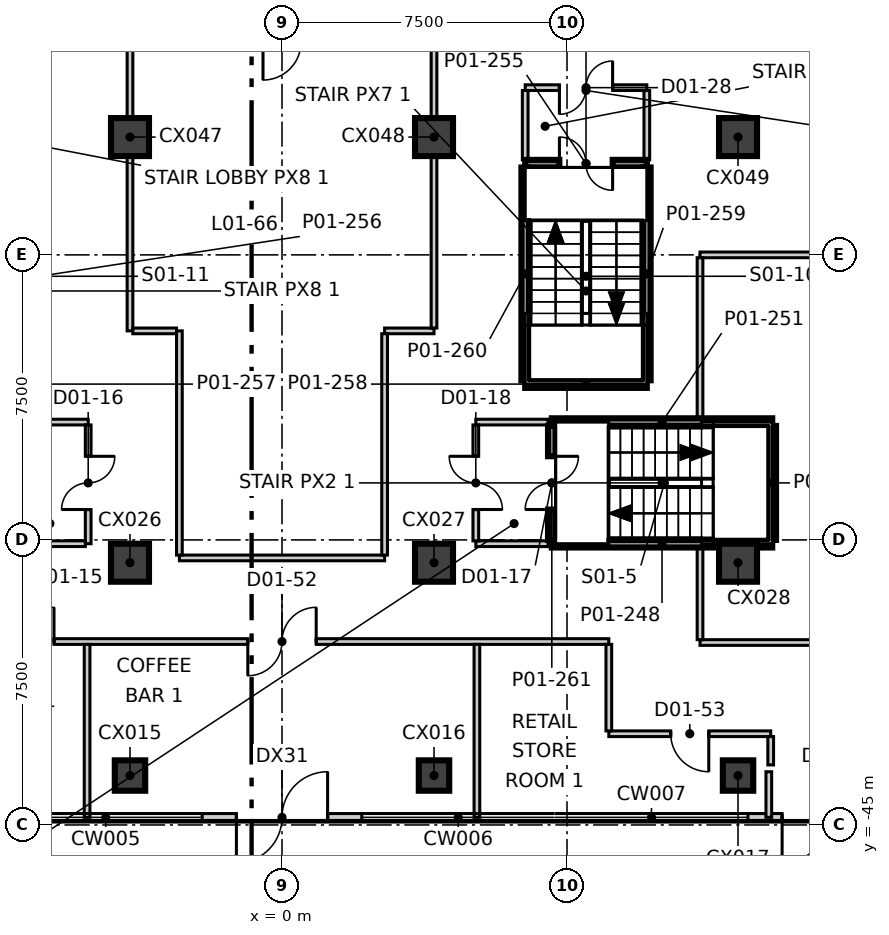
"""IFC4 building model, lengths in metres.
Left out: names, types, materials, properties, quantities, classifications, styles, units other than length and angle.
Written with IfcOpenShell. Run it as: python <this file> out.ifc"""

import sys

from ifc_helpers import new_model, si_unit, direction, frame, frame_2d, origin, origin_2d, place, context, subcontext, project, spatial, rectangle, extrude, element, fill, save


model = new_model("IFC4")
c1 = context("Model", 3, precision=1e-05, world=origin(), true_north=direction((0.0, 1.0)))
c2 = subcontext(c1, "Body", "Model", "MODEL_VIEW")
j1 = project(units=[si_unit("LENGTHUNIT", "METRE"), si_unit("PLANEANGLEUNIT", "RADIAN")], contexts=[c1])
p1 = place(None, origin())
s1 = spatial("IfcSite", under=j1, at=p1, CompositionType="ELEMENT")
p2 = place(p1, origin())
s2 = spatial("IfcBuilding", under=s1, at=p2, CompositionType="ELEMENT")
p3 = place(p2, frame((0.0, 0.0, 8.5)))
s3 = spatial("IfcBuildingStorey", under=s2, at=p3, CompositionType="ELEMENT", Elevation=8.5)
for number, where, z_axis, x_axis in (
    (1, (-4.0, -43.7, -0.4), (0.0, 0.0, 1.0), (1.0, 0.0, 0.0)),
    (2, (4.0, -43.7, -0.4), (0.0, 0.0, 1.0), (1.0, 0.0, 0.0)),
    (3, (12.0, -43.7, -0.4), (0.0, 0.0, 1.0), (1.0, 0.0, 0.0)),
):
    element("IfcColumn", number, at=place(p3, frame(where, z_axis=z_axis, x_axis=x_axis)), inside=s3, PredefinedType="COLUMN", context=c2, shape_type="SweptSolid", body=[
        extrude(rectangle(XDim=0.8, YDim=0.8, at=origin_2d()), origin(), (0.0, 0.0, 1.0), 6.0),
    ])
for number, where, z_axis, x_axis in (
    (4, (-4.0, -38.1, -0.4), (0.0, 0.0, 1.0), (1.0, 0.0, 0.0)),
    (5, (4.0, -38.1, -0.4), (0.0, 0.0, 1.0), (1.0, 0.0, 0.0)),
    (6, (12.0, -38.1, -0.4), (0.0, 0.0, 1.0), (1.0, 0.0, 0.0)),
    (7, (-4.0, -26.9, -0.4), (0.0, 0.0, 1.0), (1.0, 0.0, 0.0)),
    (8, (4.0, -26.9, -0.4), (0.0, 0.0, 1.0), (1.0, 0.0, 0.0)),
    (9, (12.0, -26.9, -0.4), (0.0, 0.0, 1.0), (1.0, 0.0, 0.0)),
):
    element("IfcColumn", number, at=place(p3, frame(where, z_axis=z_axis, x_axis=x_axis)), inside=s3, PredefinedType="COLUMN", context=c2, shape_type="SweptSolid", body=[
        extrude(rectangle(XDim=1.0, YDim=1.0, at=origin_2d()), origin(), (0.0, 0.0, 1.0), 6.0),
    ])
p4 = place(p3, frame((-2.1, -44.8, 0.0), z_axis=(0.0, 0.0, 1.0), x_axis=(1.0, 0.0, 0.0)))
e10 = element("IfcWall", 10, at=p4, inside=s3, PredefinedType="ELEMENTEDWALL", context=c2, shape_type="SweptSolid", body=[
    extrude(rectangle(XDim=4.2, YDim=0.2, at=frame_2d((2.1, 0.0))), origin(), (0.0, 0.0, 1.0), 5.6),
])
p5 = place(p4, frame((0.9, 0.0, 0.0)))
e11 = element("IfcOpeningElement", 11, at=p5, cuts=e10, PredefinedType="OPENING", context=c2, shape_type="SweptSolid", body=[
    extrude(rectangle(XDim=2.4, YDim=2.4, at=frame_2d((1.2, 1.2))), frame((0.0, 0.11, 0.0), z_axis=(0.0, -1.0, 0.0), x_axis=(1.0, 0.0, 0.0)), (0.0, 0.0, 1.0), 0.22),
])
p6 = place(p3, frame((12.26, -44.8, 0.0), z_axis=(0.0, 0.0, 1.0), x_axis=(1.0, 0.0, 0.0)))
e12 = element("IfcWall", 12, at=p6, inside=s3, PredefinedType="ELEMENTEDWALL", context=c2, shape_type="SweptSolid", body=[
    extrude(rectangle(XDim=4.2, YDim=0.2, at=frame_2d((2.1, 0.0))), origin(), (0.0, 0.0, 1.0), 5.6),
])
p7 = place(p6, frame((0.9, 0.0, 0.0)))
e13 = element("IfcOpeningElement", 13, at=p7, cuts=e12, PredefinedType="OPENING", context=c2, shape_type="SweptSolid", body=[
    extrude(rectangle(XDim=2.4, YDim=2.4, at=frame_2d((1.2, 1.2))), frame((0.0, 0.11, 0.0), z_axis=(0.0, -1.0, 0.0), x_axis=(1.0, 0.0, 0.0)), (0.0, 0.0, 1.0), 0.22),
])
p8 = place(p3, frame((6.4, -25.6, 0.0), z_axis=(0.0, 0.0, 1.0), x_axis=(1.0, 0.0, 0.0)))
e14 = element("IfcWall", 14, at=p8, inside=s3, PredefinedType="PARTITIONING", context=c2, shape_type="SweptSolid", body=[
    extrude(rectangle(XDim=3.2, YDim=0.15, at=frame_2d((1.6, 0.0))), origin(), (0.0, 0.0, 1.0), 5.6),
])
p9 = place(p8, frame((0.9, 0.0, 0.0)))
e15 = element("IfcOpeningElement", 15, at=p9, cuts=e14, PredefinedType="OPENING", context=c2, shape_type="SweptSolid", body=[
    extrude(rectangle(XDim=1.4, YDim=2.1, at=frame_2d((0.7, 1.05))), frame((0.0, 0.085, 0.0), z_axis=(0.0, -1.0, 0.0), x_axis=(1.0, 0.0, 0.0)), (0.0, 0.0, 1.0), 0.17),
])
for number, where, z_axis, x_axis in (
    (16, (-7.0, -34.4, 0.0), (0.0, 0.0, 1.0), (1.0, 0.0, 0.0)),
    (17, (5.1, -34.4, 0.0), (0.0, 0.0, 1.0), (1.0, 0.0, 0.0)),
):
    element("IfcWall", number, at=place(p3, frame(where, z_axis=z_axis, x_axis=x_axis)), inside=s3, PredefinedType="PARTITIONING", context=c2, shape_type="SweptSolid", body=[
        extrude(rectangle(XDim=1.9, YDim=0.15, at=frame_2d((0.95, 0.0))), origin(), (0.0, 0.0, 1.0), 5.6),
    ])
p10 = place(p3, frame((-5.1, -37.6, 0.0), z_axis=(0.0, 0.0, 1.0), x_axis=(0.0, 1.0, 0.0)))
e18 = element("IfcWall", 18, at=p10, inside=s3, PredefinedType="PARTITIONING", context=c2, shape_type="SweptSolid", body=[
    extrude(rectangle(XDim=3.125, YDim=0.15, at=frame_2d((1.562, 0.0))), origin(), (0.0, 0.0, 1.0), 5.6),
])
p11 = place(p10, frame((0.9, 0.0, 0.0)))
e19 = element("IfcOpeningElement", 19, at=p11, cuts=e18, PredefinedType="OPENING", context=c2, shape_type="SweptSolid", body=[
    extrude(rectangle(XDim=1.4, YDim=2.1, at=frame_2d((0.7, 1.05))), frame((0.0, 0.085, 0.0), z_axis=(0.0, -1.0, 0.0), x_axis=(1.0, 0.0, 0.0)), (0.0, 0.0, 1.0), 0.17),
])
p12 = place(p3, frame((-7.0, -37.6, 0.0), z_axis=(0.0, 0.0, 1.0), x_axis=(1.0, 0.0, 0.0)))
e20 = element("IfcWall", 20, at=p12, inside=s3, PredefinedType="PARTITIONING", context=c2, shape_type="SweptSolid", body=[
    extrude(rectangle(XDim=1.825, YDim=0.15, at=frame_2d((0.913, 0.0))), origin(), (0.0, 0.0, 1.0), 5.6),
])
p13 = place(p3, frame((5.1, -37.6, 0.0), z_axis=(0.0, 0.0, 1.0), x_axis=(1.0, 0.0, 0.0)))
e21 = element("IfcWall", 21, at=p13, inside=s3, PredefinedType="PARTITIONING", context=c2, shape_type="SweptSolid", body=[
    extrude(rectangle(XDim=1.9, YDim=0.15, at=frame_2d((0.95, 0.0))), origin(), (0.0, 0.0, 1.0), 5.6),
])
for number, where, z_axis, x_axis in (
    (22, (6.4, -27.5, 0.0), (0.0, 0.0, 1.0), (0.0, 1.0, 0.0)),
    (23, (9.6, -27.5, 0.0), (0.0, 0.0, 1.0), (0.0, 1.0, 0.0)),
):
    element("IfcWall", number, at=place(p3, frame(where, z_axis=z_axis, x_axis=x_axis)), inside=s3, PredefinedType="PARTITIONING", context=c2, shape_type="SweptSolid", body=[
        extrude(rectangle(XDim=1.825, YDim=0.15, at=frame_2d((0.913, 0.0))), origin(), (0.0, 0.0, 1.0), 5.6),
    ])
p14 = place(p3, frame((5.1, -37.525, 0.0), z_axis=(0.0, 0.0, 1.0), x_axis=(0.0, 1.0, 0.0)))
e24 = element("IfcWall", 24, at=p14, inside=s3, PredefinedType="PARTITIONING", context=c2, shape_type="SweptSolid", body=[
    extrude(rectangle(XDim=3.05, YDim=0.15, at=frame_2d((1.525, 0.0))), origin(), (0.0, 0.0, 1.0), 5.6),
])
p15 = place(p14, frame((0.825, 0.0, 0.0)))
e25 = element("IfcOpeningElement", 25, at=p15, cuts=e24, PredefinedType="OPENING", context=c2, shape_type="SweptSolid", body=[
    extrude(rectangle(XDim=1.4, YDim=2.1, at=frame_2d((0.7, 1.05))), frame((0.0, 0.085, 0.0), z_axis=(0.0, -1.0, 0.0), x_axis=(1.0, 0.0, 0.0)), (0.0, 0.0, 1.0), 0.17),
])
p16 = place(p3, frame((8.6, -42.6, 0.0), z_axis=(0.0, 0.0, 1.0), x_axis=(1.0, 0.0, 0.0)))
e26 = element("IfcWall", 26, at=p16, inside=s3, PredefinedType="PARTITIONING", context=c2, shape_type="SweptSolid", body=[
    extrude(rectangle(XDim=4.26, YDim=0.15, at=frame_2d((2.13, 0.0))), origin(), (0.0, 0.0, 1.0), 5.6),
])
p17 = place(p16, frame((1.63, 0.0, 0.0)))
e27 = element("IfcOpeningElement", 27, at=p17, cuts=e26, PredefinedType="OPENING", context=c2, shape_type="SweptSolid", body=[
    extrude(rectangle(XDim=1.0, YDim=2.1, at=frame_2d((0.5, 1.05))), frame((0.0, 0.085, 0.0), z_axis=(0.0, -1.0, 0.0), x_axis=(1.0, 0.0, 0.0)), (0.0, 0.0, 1.0), 0.17),
])
p18 = place(p3, frame((11.0, -40.2, 0.0), z_axis=(0.0, 0.0, 1.0), x_axis=(1.0, 0.0, 0.0)))
e28 = element("IfcWall", 28, at=p18, inside=s3, PredefinedType="PARTITIONING", context=c2, shape_type="SweptSolid", body=[
    extrude(rectangle(XDim=14.925, YDim=0.15, at=frame_2d((7.462, 0.0))), origin(), (0.0, 0.0, 1.0), 5.6),
])
p19 = place(p18, frame((6.3, 0.0, 0.0)))
e29 = element("IfcOpeningElement", 29, at=p19, cuts=e28, PredefinedType="OPENING", context=c2, shape_type="SweptSolid", body=[
    extrude(rectangle(XDim=2.4, YDim=2.1, at=frame_2d((1.2, 1.05))), frame((0.0, 0.085, 0.0), z_axis=(0.0, -1.0, 0.0), x_axis=(1.0, 0.0, 0.0)), (0.0, 0.0, 1.0), 0.17),
])
p20 = place(p3, frame((11.0, -30.0, 0.0), z_axis=(0.0, 0.0, 1.0), x_axis=(1.0, 0.0, 0.0)))
e30 = element("IfcWall", 30, at=p20, inside=s3, PredefinedType="PARTITIONING", context=c2, shape_type="SweptSolid", body=[
    extrude(rectangle(XDim=6.5, YDim=0.15, at=frame_2d((3.25, 0.0))), origin(), (0.0, 0.0, 1.0), 5.6),
])
p21 = place(p3, frame((-8.525, -40.174, 0.0), z_axis=(0.0, 0.0, 1.0), x_axis=(1.0, 0.0, 0.0)))
e31 = element("IfcWall", 31, at=p21, inside=s3, PredefinedType="PARTITIONING", context=c2, shape_type="SweptSolid", body=[
    extrude(rectangle(XDim=17.125, YDim=0.15, at=frame_2d((8.562, 0.0))), origin(), (0.0, 0.0, 1.0), 5.6),
])
p22 = place(p21, frame((0.725, 0.0, 0.0)))
e32 = element("IfcOpeningElement", 32, at=p22, cuts=e31, PredefinedType="OPENING", context=c2, shape_type="SweptSolid", body=[
    extrude(rectangle(XDim=1.8, YDim=2.1, at=frame_2d((0.9, 1.05))), frame((0.0, 0.085, 0.0), z_axis=(0.0, -1.0, 0.0), x_axis=(1.0, 0.0, 0.0)), (0.0, 0.0, 1.0), 0.17),
])
p23 = place(p21, frame((7.625, 0.0, 0.0)))
e33 = element("IfcOpeningElement", 33, at=p23, cuts=e31, PredefinedType="OPENING", context=c2, shape_type="SweptSolid", body=[
    extrude(rectangle(XDim=1.8, YDim=2.1, at=frame_2d((0.9, 1.05))), frame((0.0, 0.085, 0.0), z_axis=(0.0, -1.0, 0.0), x_axis=(1.0, 0.0, 0.0)), (0.0, 0.0, 1.0), 0.17),
])
p24 = place(p3, frame((-5.129, -44.8, 0.0), z_axis=(0.0, 0.0, 1.0), x_axis=(0.0, 1.0, 0.0)))
e34 = element("IfcWall", 34, at=p24, inside=s3, PredefinedType="PARTITIONING", context=c2, shape_type="SweptSolid", body=[
    extrude(rectangle(XDim=4.551, YDim=0.15, at=frame_2d((2.275, 0.0))), origin(), (0.0, 0.0, 1.0), 5.6),
])
p25 = place(p3, frame((-4.0, -32.0, 0.0), z_axis=(0.0, 0.0, 1.0), x_axis=(0.0, 1.0, 0.0)))
e35 = element("IfcWall", 35, at=p25, inside=s3, PredefinedType="PARTITIONING", context=c2, shape_type="SweptSolid", body=[
    extrude(rectangle(XDim=7.6, YDim=0.15, at=frame_2d((3.8, 0.0))), origin(), (0.0, 0.0, 1.0), 5.6),
])
p26 = place(p3, frame((5.129, -44.8, 0.0), z_axis=(0.0, 0.0, 1.0), x_axis=(0.0, 1.0, 0.0)))
e36 = element("IfcWall", 36, at=p26, inside=s3, PredefinedType="PARTITIONING", context=c2, shape_type="SweptSolid", body=[
    extrude(rectangle(XDim=4.551, YDim=0.15, at=frame_2d((2.275, 0.0))), origin(), (0.0, 0.0, 1.0), 5.6),
])
p27 = place(p3, frame((8.6, -42.525, 0.0), z_axis=(0.0, 0.0, 1.0), x_axis=(0.0, 1.0, 0.0)))
e37 = element("IfcWall", 37, at=p27, inside=s3, PredefinedType="PARTITIONING", context=c2, shape_type="SweptSolid", body=[
    extrude(rectangle(XDim=2.276, YDim=0.15, at=frame_2d((1.138, 0.0))), origin(), (0.0, 0.0, 1.0), 5.6),
])
p28 = place(p3, frame((12.86, -43.421, 0.0), z_axis=(0.0, 0.0, 1.0), x_axis=(0.0, 1.0, 0.0)))
e38 = element("IfcWall", 38, at=p28, inside=s3, PredefinedType="PARTITIONING", context=c2, shape_type="SweptSolid", body=[
    extrude(rectangle(XDim=0.746, YDim=0.15, at=frame_2d((0.373, 0.0))), origin(), (0.0, 0.0, 1.0), 5.6),
])
p29 = place(p3, frame((12.81, -44.8, 0.0), z_axis=(0.0, 0.0, 1.0), x_axis=(0.0, 1.0, 0.0)))
e39 = element("IfcWall", 39, at=p29, inside=s3, PredefinedType="PARTITIONING", context=c2, shape_type="SweptSolid", body=[
    extrude(rectangle(XDim=1.2, YDim=0.15, at=frame_2d((0.6, 0.0))), origin(), (0.0, 0.0, 1.0), 5.6),
])
p30 = place(p3, frame((11.0, -40.125, 0.0), z_axis=(0.0, 0.0, 1.0), x_axis=(0.0, 1.0, 0.0)))
e40 = element("IfcWall", 40, at=p30, inside=s3, PredefinedType="PARTITIONING", context=c2, shape_type="SweptSolid", body=[
    extrude(rectangle(XDim=2.425, YDim=0.15, at=frame_2d((1.212, 0.0))), origin(), (0.0, 0.0, 1.0), 5.6),
])
p31 = place(p3, frame((11.0, -34.3, 0.0), z_axis=(0.0, 0.0, 1.0), x_axis=(0.0, 1.0, 0.0)))
e41 = element("IfcWall", 41, at=p31, inside=s3, PredefinedType="PARTITIONING", context=c2, shape_type="SweptSolid", body=[
    extrude(rectangle(XDim=4.225, YDim=0.15, at=frame_2d((2.113, 0.0))), origin(), (0.0, 0.0, 1.0), 5.6),
])
p32 = place(p3, frame((-2.7, -37.974, 0.0), z_axis=(0.0, 0.0, 1.0), x_axis=(1.0, 0.0, 0.0)))
e42 = element("IfcWall", 42, at=p32, inside=s3, PredefinedType="PARTITIONING", context=c2, shape_type="SweptSolid", body=[
    extrude(rectangle(XDim=5.4, YDim=0.15, at=frame_2d((2.7, 0.0))), origin(), (0.0, 0.0, 1.0), 5.6),
])
p33 = place(p3, frame((-2.7, -37.899, 0.0), z_axis=(0.0, 0.0, 1.0), x_axis=(0.0, 1.0, 0.0)))
e43 = element("IfcWall", 43, at=p33, inside=s3, PredefinedType="PARTITIONING", context=c2, shape_type="SweptSolid", body=[
    extrude(rectangle(XDim=5.899, YDim=0.15, at=frame_2d((2.949, 0.0))), origin(), (0.0, 0.0, 1.0), 5.6),
])
p34 = place(p3, frame((-3.925, -32.0, 0.0), z_axis=(0.0, 0.0, 1.0), x_axis=(1.0, 0.0, 0.0)))
e44 = element("IfcWall", 44, at=p34, inside=s3, PredefinedType="PARTITIONING", context=c2, shape_type="SweptSolid", body=[
    extrude(rectangle(XDim=1.15, YDim=0.15, at=frame_2d((0.575, 0.0))), origin(), (0.0, 0.0, 1.0), 5.6),
])
p35 = place(p3, frame((2.7, -32.0, 0.0), z_axis=(0.0, 0.0, 1.0), x_axis=(1.0, 0.0, 0.0)))
e45 = element("IfcWall", 45, at=p35, inside=s3, PredefinedType="PARTITIONING", context=c2, shape_type="SweptSolid", body=[
    extrude(rectangle(XDim=1.3, YDim=0.15, at=frame_2d((0.65, 0.0))), origin(), (0.0, 0.0, 1.0), 5.6),
])
p36 = place(p3, frame((4.0, -31.925, 0.0), z_axis=(0.0, 0.0, 1.0), x_axis=(0.0, 1.0, 0.0)))
e46 = element("IfcWall", 46, at=p36, inside=s3, PredefinedType="PARTITIONING", context=c2, shape_type="SweptSolid", body=[
    extrude(rectangle(XDim=7.45, YDim=0.15, at=frame_2d((3.725, 0.0))), origin(), (0.0, 0.0, 1.0), 5.6),
])
p37 = place(p3, frame((2.7, -37.899, 0.0), z_axis=(0.0, 0.0, 1.0), x_axis=(0.0, 1.0, 0.0)))
e47 = element("IfcWall", 47, at=p37, inside=s3, PredefinedType="PARTITIONING", context=c2, shape_type="SweptSolid", body=[
    extrude(rectangle(XDim=5.824, YDim=0.15, at=frame_2d((2.912, 0.0))), origin(), (0.0, 0.0, 1.0), 5.6),
])
for number, where, z_axis, x_axis in (
    (48, (7.1, -37.6, 0.0), (0.0, 0.0, 1.0), (1.0, 0.0, 0.0)),
    (49, (7.1, -34.4, 0.0), (0.0, 0.0, 1.0), (1.0, 0.0, 0.0)),
):
    element("IfcWall", number, at=place(p3, frame(where, z_axis=z_axis, x_axis=x_axis)), inside=s3, PredefinedType="SOLIDWALL", context=c2, shape_type="SweptSolid", body=[
        extrude(rectangle(XDim=5.8, YDim=0.2, at=frame_2d((2.9, 0.0))), origin(), (0.0, 0.0, 1.0), 5.6),
    ])
p38 = place(p3, frame((6.4, -27.6, 0.0), z_axis=(0.0, 0.0, 1.0), x_axis=(1.0, 0.0, 0.0)))
e50 = element("IfcWall", 50, at=p38, inside=s3, PredefinedType="SOLIDWALL", context=c2, shape_type="SweptSolid", body=[
    extrude(rectangle(XDim=3.2, YDim=0.2, at=frame_2d((1.6, 0.0))), origin(), (0.0, 0.0, 1.0), 5.6),
])
p39 = place(p38, frame((0.9, 0.0, 0.0)))
e51 = element("IfcOpeningElement", 51, at=p39, cuts=e50, PredefinedType="OPENING", context=c2, shape_type="SweptSolid", body=[
    extrude(rectangle(XDim=1.4, YDim=2.1, at=frame_2d((0.7, 1.05))), frame((0.0, 0.11, 0.0), z_axis=(0.0, -1.0, 0.0), x_axis=(1.0, 0.0, 0.0)), (0.0, 0.0, 1.0), 0.22),
])
p40 = place(p3, frame((6.4, -33.4, 0.0), z_axis=(0.0, 0.0, 1.0), x_axis=(1.0, 0.0, 0.0)))
e52 = element("IfcWall", 52, at=p40, inside=s3, PredefinedType="SOLIDWALL", context=c2, shape_type="SweptSolid", body=[
    extrude(rectangle(XDim=3.2, YDim=0.2, at=frame_2d((1.6, 0.0))), origin(), (0.0, 0.0, 1.0), 5.6),
])
p41 = place(p3, frame((9.6, -33.3, 0.0), z_axis=(0.0, 0.0, 1.0), x_axis=(0.0, 1.0, 0.0)))
e53 = element("IfcWall", 53, at=p41, inside=s3, PredefinedType="SOLIDWALL", context=c2, shape_type="SweptSolid", body=[
    extrude(rectangle(XDim=5.6, YDim=0.2, at=frame_2d((2.8, 0.0))), origin(), (0.0, 0.0, 1.0), 5.6),
])
p42 = place(p3, frame((6.4, -33.3, 0.0), z_axis=(0.0, 0.0, 1.0), x_axis=(0.0, 1.0, 0.0)))
e54 = element("IfcWall", 54, at=p42, inside=s3, PredefinedType="SOLIDWALL", context=c2, shape_type="SweptSolid", body=[
    extrude(rectangle(XDim=5.598, YDim=0.2, at=frame_2d((2.799, 0.0))), origin(), (0.0, 0.0, 1.0), 5.6),
])
p43 = place(p3, frame((7.1, -37.5, 0.0), z_axis=(0.0, 0.0, 1.0), x_axis=(0.0, 1.0, 0.0)))
e55 = element("IfcWall", 55, at=p43, inside=s3, PredefinedType="SOLIDWALL", context=c2, shape_type="SweptSolid", body=[
    extrude(rectangle(XDim=3.0, YDim=0.2, at=frame_2d((1.5, 0.0))), origin(), (0.0, 0.0, 1.0), 5.6),
])
p44 = place(p43, frame((0.8, 0.0, 0.0)))
e56 = element("IfcOpeningElement", 56, at=p44, cuts=e55, PredefinedType="OPENING", context=c2, shape_type="SweptSolid", body=[
    extrude(rectangle(XDim=1.4, YDim=2.1, at=frame_2d((0.7, 1.05))), frame((0.0, 0.11, 0.0), z_axis=(0.0, -1.0, 0.0), x_axis=(1.0, 0.0, 0.0)), (0.0, 0.0, 1.0), 0.22),
])
p45 = place(p3, frame((12.9, -37.5, 0.0), z_axis=(0.0, 0.0, 1.0), x_axis=(0.0, 1.0, 0.0)))
e57 = element("IfcWall", 57, at=p45, inside=s3, PredefinedType="SOLIDWALL", context=c2, shape_type="SweptSolid", body=[
    extrude(rectangle(XDim=3.0, YDim=0.2, at=frame_2d((1.5, 0.0))), origin(), (0.0, 0.0, 1.0), 5.6),
])
p46 = place(p5, frame((2.4, 0.0, 0.0), z_axis=(0.0, 0.0, 1.0), x_axis=(-1.0, 0.0, 0.0)))
e58 = element("IfcDoor", 58, at=p46, inside=s3, OperationType="DOUBLE_DOOR_SINGLE_SWING", PredefinedType="DOOR", context=c2, shape_type="SweptSolid", body=[
    extrude(rectangle(XDim=2.4, YDim=2.4, at=frame_2d((1.2, 1.2))), frame((0.0, 0.025, 0.0), z_axis=(0.0, -1.0, 0.0), x_axis=(1.0, 0.0, 0.0)), (0.0, 0.0, 1.0), 0.05),
])
fill(e11, e58)
p47 = place(p7, frame((2.4, 0.0, 0.0), z_axis=(0.0, 0.0, 1.0), x_axis=(-1.0, 0.0, 0.0)))
e59 = element("IfcDoor", 59, at=p47, inside=s3, OperationType="DOUBLE_DOOR_SINGLE_SWING", PredefinedType="DOOR", context=c2, shape_type="SweptSolid", body=[
    extrude(rectangle(XDim=2.4, YDim=2.4, at=frame_2d((1.2, 1.2))), frame((0.0, 0.025, 0.0), z_axis=(0.0, -1.0, 0.0), x_axis=(1.0, 0.0, 0.0)), (0.0, 0.0, 1.0), 0.05),
])
fill(e13, e59)
p48 = place(p11, origin())
e60 = element("IfcDoor", 60, at=p48, inside=s3, OperationType="DOUBLE_DOOR_SINGLE_SWING", PredefinedType="DOOR", context=c2, shape_type="SweptSolid", body=[
    extrude(rectangle(XDim=1.4, YDim=2.1, at=frame_2d((0.7, 1.05))), frame((0.0, 0.025, 0.0), z_axis=(0.0, -1.0, 0.0), x_axis=(1.0, 0.0, 0.0)), (0.0, 0.0, 1.0), 0.05),
])
fill(e19, e60)
p49 = place(p44, origin())
e61 = element("IfcDoor", 61, at=p49, inside=s3, OperationType="DOUBLE_DOOR_SINGLE_SWING", PredefinedType="DOOR", context=c2, shape_type="SweptSolid", body=[
    extrude(rectangle(XDim=1.4, YDim=2.1, at=frame_2d((0.7, 1.05))), frame((0.0, 0.025, 0.0), z_axis=(0.0, -1.0, 0.0), x_axis=(1.0, 0.0, 0.0)), (0.0, 0.0, 1.0), 0.05),
])
fill(e56, e61)
p50 = place(p15, origin())
e62 = element("IfcDoor", 62, at=p50, inside=s3, OperationType="DOUBLE_DOOR_SINGLE_SWING", PredefinedType="DOOR", context=c2, shape_type="SweptSolid", body=[
    extrude(rectangle(XDim=1.4, YDim=2.1, at=frame_2d((0.7, 1.05))), frame((0.0, 0.025, 0.0), z_axis=(0.0, -1.0, 0.0), x_axis=(1.0, 0.0, 0.0)), (0.0, 0.0, 1.0), 0.05),
])
fill(e25, e62)
p51 = place(p39, origin())
e63 = element("IfcDoor", 63, at=p51, inside=s3, OperationType="DOUBLE_DOOR_SINGLE_SWING", PredefinedType="DOOR", context=c2, shape_type="SweptSolid", body=[
    extrude(rectangle(XDim=1.4, YDim=2.1, at=frame_2d((0.7, 1.05))), frame((0.0, 0.025, 0.0), z_axis=(0.0, -1.0, 0.0), x_axis=(1.0, 0.0, 0.0)), (0.0, 0.0, 1.0), 0.05),
])
fill(e51, e63)
p52 = place(p9, origin())
e64 = element("IfcDoor", 64, at=p52, inside=s3, OperationType="DOUBLE_DOOR_SINGLE_SWING", PredefinedType="DOOR", context=c2, shape_type="SweptSolid", body=[
    extrude(rectangle(XDim=1.4, YDim=2.1, at=frame_2d((0.7, 1.05))), frame((0.0, 0.025, 0.0), z_axis=(0.0, -1.0, 0.0), x_axis=(1.0, 0.0, 0.0)), (0.0, 0.0, 1.0), 0.05),
])
fill(e15, e64)
p53 = place(p22, origin())
e65 = element("IfcDoor", 65, at=p53, inside=s3, OperationType="DOUBLE_DOOR_SINGLE_SWING", PredefinedType="DOOR", context=c2, shape_type="SweptSolid", body=[
    extrude(rectangle(XDim=1.8, YDim=2.1, at=frame_2d((0.9, 1.05))), frame((0.0, 0.025, 0.0), z_axis=(0.0, -1.0, 0.0), x_axis=(1.0, 0.0, 0.0)), (0.0, 0.0, 1.0), 0.05),
])
fill(e32, e65)
p54 = place(p23, origin())
e66 = element("IfcDoor", 66, at=p54, inside=s3, OperationType="DOUBLE_DOOR_SINGLE_SWING", PredefinedType="DOOR", context=c2, shape_type="SweptSolid", body=[
    extrude(rectangle(XDim=1.8, YDim=2.1, at=frame_2d((0.9, 1.05))), frame((0.0, 0.025, 0.0), z_axis=(0.0, -1.0, 0.0), x_axis=(1.0, 0.0, 0.0)), (0.0, 0.0, 1.0), 0.05),
])
fill(e33, e66)
p55 = place(p17, origin())
e67 = element("IfcDoor", 67, at=p55, inside=s3, OperationType="SINGLE_SWING_RIGHT", PredefinedType="DOOR", context=c2, shape_type="SweptSolid", body=[
    extrude(rectangle(XDim=1.0, YDim=2.1, at=frame_2d((0.5, 1.05))), frame((0.0, 0.025, 0.0), z_axis=(0.0, -1.0, 0.0), x_axis=(1.0, 0.0, 0.0)), (0.0, 0.0, 1.0), 0.05),
])
fill(e27, e67)
save(model, sys.argv[1])
